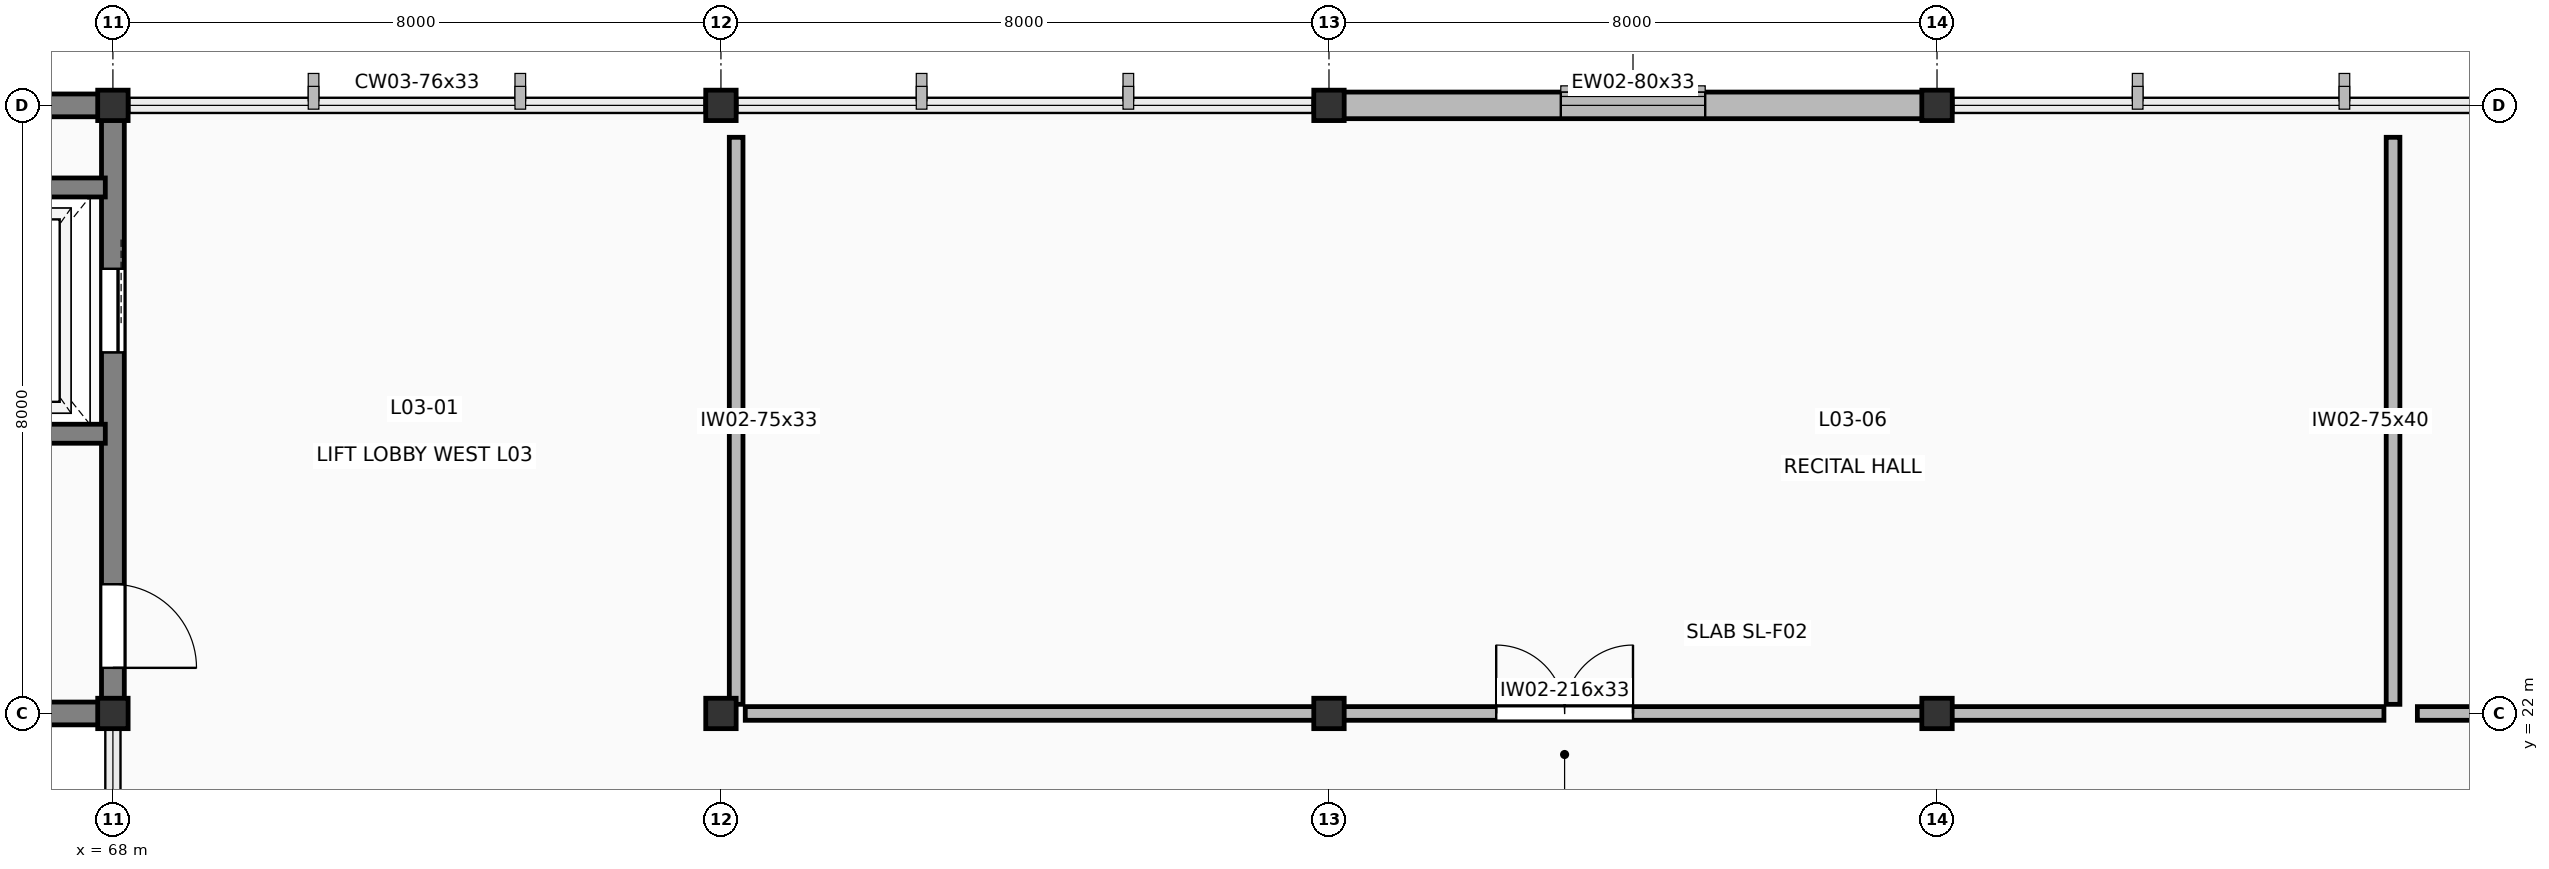
"""IFC4 building model, lengths in metres.
Left out: names, types, materials, properties, quantities, classifications, styles, units other than length and angle.
Written with IfcOpenShell. Run it as: python <this file> out.ifc"""

import sys

from ifc_helpers import new_model, si_unit, direction, frame, frame_2d, origin, origin_2d, place, context, subcontext, project, spatial, rectangle, extrude, element, fill, save


model = new_model("IFC4")
c1 = context("Model", 3, precision=1e-05, world=origin(), true_north=direction((0.0, 1.0)))
c2 = subcontext(c1, "Body", "Model", "MODEL_VIEW")
j1 = project(units=[si_unit("LENGTHUNIT", "METRE"), si_unit("PLANEANGLEUNIT", "RADIAN")], contexts=[c1])
p1 = place(None, origin())
s1 = spatial("IfcSite", under=j1, at=p1, CompositionType="ELEMENT")
p2 = place(p1, origin())
s2 = spatial("IfcBuilding", under=s1, at=p2, CompositionType="ELEMENT")
p3 = place(p2, frame((0.0, 0.0, 13.8)))
s3 = spatial("IfcBuildingStorey", under=s2, at=p3, CompositionType="ELEMENT", Elevation=13.8)
for number, where, z_axis, x_axis in (
    (1, (68.0, 22.0, 0.0), (0.0, 0.0, 1.0), (1.0, 0.0, 0.0)),
    (2, (68.0, 30.0, 0.0), (0.0, 0.0, 1.0), (1.0, 0.0, 0.0)),
    (3, (76.0, 22.0, 0.0), (0.0, 0.0, 1.0), (1.0, 0.0, 0.0)),
    (4, (76.0, 30.0, 0.0), (0.0, 0.0, 1.0), (1.0, 0.0, 0.0)),
    (5, (84.0, 22.0, 0.0), (0.0, 0.0, 1.0), (1.0, 0.0, 0.0)),
    (6, (84.0, 30.0, 0.0), (0.0, 0.0, 1.0), (1.0, 0.0, 0.0)),
    (7, (92.0, 22.0, 0.0), (0.0, 0.0, 1.0), (1.0, 0.0, 0.0)),
    (8, (92.0, 30.0, 0.0), (0.0, 0.0, 1.0), (1.0, 0.0, 0.0)),
):
    element("IfcColumn", number, at=place(p3, frame(where, z_axis=z_axis, x_axis=x_axis)), inside=s3, PredefinedType="COLUMN", context=c2, shape_type="SweptSolid", body=[
        extrude(rectangle(XDim=0.4, YDim=0.4, at=origin_2d()), origin(), (0.0, 0.0, 1.0), 4.2),
    ])
p4 = place(p3, frame((60.0, 30.0, 0.0), z_axis=(0.0, 0.0, 1.0), x_axis=(1.0, 0.0, 0.0)))
e9 = element("IfcWall", 9, at=p4, inside=s3, PredefinedType="SOLIDWALL", context=c2, shape_type="SweptSolid", body=[
    extrude(rectangle(XDim=8.0, YDim=0.3, at=frame_2d((4.0, 0.0))), origin(), (0.0, 0.0, 1.0), 4.2),
])
p5 = place(p3, frame((84.0, 30.0, 0.0), z_axis=(0.0, 0.0, 1.0), x_axis=(1.0, 0.0, 0.0)))
e10 = element("IfcWall", 10, at=p5, inside=s3, PredefinedType="SOLIDWALL", context=c2, shape_type="SweptSolid", body=[
    extrude(rectangle(XDim=8.0, YDim=0.35, at=frame_2d((4.0, 0.0))), origin(), (0.0, 0.0, 1.0), 3.265),
])
p6 = place(p5, frame((3.05, 0.0, 0.9)))
e11 = element("IfcOpeningElement", 11, at=p6, cuts=e10, PredefinedType="OPENING", context=c2, shape_type="SweptSolid", body=[
    extrude(rectangle(XDim=1.9, YDim=2.1, at=frame_2d((0.95, 1.05))), frame((0.0, 0.185, 0.0), z_axis=(0.0, -1.0, 0.0), x_axis=(1.0, 0.0, 0.0)), (0.0, 0.0, 1.0), 0.37),
])
p7 = place(p3, frame((68.0, 22.0, 0.0), z_axis=(0.0, 0.0, 1.0), x_axis=(-1.0, 0.0, 0.0)))
e12 = element("IfcWall", 12, at=p7, inside=s3, PredefinedType="SHEAR", context=c2, shape_type="SweptSolid", body=[
    extrude(rectangle(XDim=8.0, YDim=0.3, at=frame_2d((4.0, 0.0))), origin(), (0.0, 0.0, 1.0), 4.2),
])
p8 = place(p3, frame((68.0, 30.0, 0.0), z_axis=(0.0, 0.0, 1.0), x_axis=(0.0, -1.0, 0.0)))
e13 = element("IfcWall", 13, at=p8, inside=s3, PredefinedType="SHEAR", context=c2, shape_type="SweptSolid", body=[
    extrude(rectangle(XDim=8.0, YDim=0.3, at=frame_2d((4.0, 0.0))), origin(), (0.0, 0.0, 1.0), 4.2),
])
p9 = place(p8, frame((6.3, 0.0, 0.0)))
e14 = element("IfcOpeningElement", 14, at=p9, cuts=e13, PredefinedType="OPENING", context=c2, shape_type="SweptSolid", body=[
    extrude(rectangle(XDim=1.1, YDim=2.2, at=frame_2d((0.55, 1.1))), frame((0.0, 0.16, 0.0), z_axis=(0.0, -1.0, 0.0), x_axis=(1.0, 0.0, 0.0)), (0.0, 0.0, 1.0), 0.32),
])
p10 = place(p8, frame((2.15, 0.0, 0.0)))
e15 = element("IfcOpeningElement", 15, at=p10, cuts=e13, PredefinedType="OPENING", context=c2, shape_type="SweptSolid", body=[
    extrude(rectangle(XDim=1.1, YDim=2.2, at=frame_2d((0.55, 1.1))), frame((0.0, 0.16, 0.0), z_axis=(0.0, -1.0, 0.0), x_axis=(1.0, 0.0, 0.0)), (0.0, 0.0, 1.0), 0.32),
])
for number, where, z_axis, x_axis in (
    (16, (65.2, 25.68, 0.0), (0.0, 0.0, 1.0), (1.0, 0.0, 0.0)),
    (17, (65.2, 28.92, 0.0), (0.0, 0.0, 1.0), (1.0, 0.0, 0.0)),
):
    element("IfcWall", number, at=place(p3, frame(where, z_axis=z_axis, x_axis=x_axis)), inside=s3, PredefinedType="SHEAR", context=c2, shape_type="SweptSolid", body=[
        extrude(rectangle(XDim=2.7, YDim=0.25, at=frame_2d((1.35, 0.0))), origin(), (0.0, 0.0, 1.0), 4.2),
    ])
p11 = place(p3, frame((76.32, 22.0, 0.0), z_axis=(0.0, 0.0, 1.0), x_axis=(1.0, 0.0, 0.0)))
e18 = element("IfcWall", 18, at=p11, inside=s3, PredefinedType="PARTITIONING", context=c2, shape_type="SweptSolid", body=[
    extrude(rectangle(XDim=21.56, YDim=0.18, at=frame_2d((10.78, 0.0))), origin(), (0.0, 0.0, 1.0), 3.265),
])
p12 = place(p11, frame((9.88, 0.0, 0.0)))
e19 = element("IfcOpeningElement", 19, at=p12, cuts=e18, PredefinedType="OPENING", context=c2, shape_type="SweptSolid", body=[
    extrude(rectangle(XDim=1.8, YDim=2.3, at=frame_2d((0.9, 1.15))), frame((0.0, 0.1, 0.0), z_axis=(0.0, -1.0, 0.0), x_axis=(1.0, 0.0, 0.0)), (0.0, 0.0, 1.0), 0.2),
])
p13 = place(p3, frame((76.2, 29.58, 0.0), z_axis=(0.0, 0.0, 1.0), x_axis=(0.0, -1.0, 0.0)))
e20 = element("IfcWall", 20, at=p13, inside=s3, PredefinedType="PARTITIONING", context=c2, shape_type="SweptSolid", body=[
    extrude(rectangle(XDim=7.46, YDim=0.18, at=frame_2d((3.73, 0.0))), origin(), (0.0, 0.0, 1.0), 3.325),
])
p14 = place(p3, frame((98.0, 22.12, 0.0), z_axis=(0.0, 0.0, 1.0), x_axis=(0.0, 1.0, 0.0)))
e21 = element("IfcWall", 21, at=p14, inside=s3, PredefinedType="PARTITIONING", context=c2, shape_type="SweptSolid", body=[
    extrude(rectangle(XDim=7.46, YDim=0.18, at=frame_2d((3.73, 0.0))), origin(), (0.0, 0.0, 1.0), 3.98),
])
p15 = place(p3, frame((98.32, 22.0, 0.0), z_axis=(0.0, 0.0, 1.0), x_axis=(1.0, 0.0, 0.0)))
e22 = element("IfcWall", 22, at=p15, inside=s3, PredefinedType="PARTITIONING", context=c2, shape_type="SweptSolid", body=[
    extrude(rectangle(XDim=17.36, YDim=0.18, at=frame_2d((8.68, 0.0))), origin(), (0.0, 0.0, 1.0), 3.265),
])
p16 = place(p15, frame((8.18, 0.0, 0.0)))
e23 = element("IfcOpeningElement", 23, at=p16, cuts=e22, PredefinedType="OPENING", context=c2, shape_type="SweptSolid", body=[
    extrude(rectangle(XDim=1.0, YDim=2.15, at=frame_2d((0.5, 1.075))), frame((0.0, 0.1, 0.0), z_axis=(0.0, -1.0, 0.0), x_axis=(1.0, 0.0, 0.0)), (0.0, 0.0, 1.0), 0.2),
])
p17 = place(p6, origin())
e24 = element("IfcWindow", 24, at=p17, inside=s3, PartitioningType="DOUBLE_PANEL_VERTICAL", PredefinedType="WINDOW", context=c2, shape_type="SweptSolid", body=[
    extrude(rectangle(XDim=1.9, YDim=2.1, at=frame_2d((0.95, 1.05))), frame((0.0, 0.03, 0.0), z_axis=(0.0, -1.0, 0.0), x_axis=(1.0, 0.0, 0.0)), (0.0, 0.0, 1.0), 0.06),
])
fill(e11, e24)
p18 = place(p9, origin())
e25 = element("IfcDoor", 25, at=p18, inside=s3, OperationType="SINGLE_SWING_RIGHT", PredefinedType="DOOR", context=c2, shape_type="SweptSolid", body=[
    extrude(rectangle(XDim=1.1, YDim=2.2, at=frame_2d((0.55, 1.1))), frame((0.0, 0.025, 0.0), z_axis=(0.0, -1.0, 0.0), x_axis=(1.0, 0.0, 0.0)), (0.0, 0.0, 1.0), 0.05),
])
fill(e14, e25)
p19 = place(p10, origin())
e26 = element("IfcDoor", 26, at=p19, inside=s3, OperationType="SLIDING_TO_LEFT", PredefinedType="DOOR", context=c2, shape_type="SweptSolid", body=[
    extrude(rectangle(XDim=1.1, YDim=2.2, at=frame_2d((0.55, 1.1))), frame((0.0, 0.025, 0.0), z_axis=(0.0, -1.0, 0.0), x_axis=(1.0, 0.0, 0.0)), (0.0, 0.0, 1.0), 0.05),
])
fill(e15, e26)
p20 = place(p12, origin())
e27 = element("IfcDoor", 27, at=p20, inside=s3, OperationType="DOUBLE_DOOR_SINGLE_SWING", PredefinedType="DOOR", context=c2, shape_type="SweptSolid", body=[
    extrude(rectangle(XDim=1.8, YDim=2.3, at=frame_2d((0.9, 1.15))), frame((0.0, 0.025, 0.0), z_axis=(0.0, -1.0, 0.0), x_axis=(1.0, 0.0, 0.0)), (0.0, 0.0, 1.0), 0.05),
])
fill(e19, e27)
save(model, sys.argv[1])
